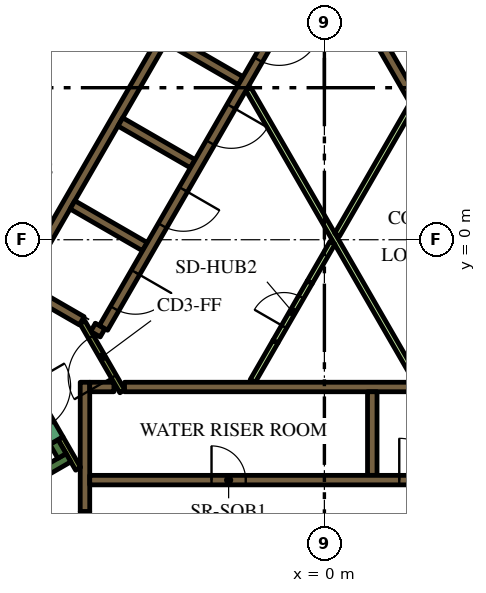
"""IFC4 building model, lengths in metres.
Left out: names, types, materials, properties, quantities, classifications, styles, units other than length and angle.
Written with IfcOpenShell. Run it as: python <this file> out.ifc"""

import sys

from ifc_helpers import new_model, si_unit, direction, frame, frame_2d, origin, place, context, subcontext, project, spatial, rectangle, extrude, element, fill, save


model = new_model("IFC4")
c1 = context("Model", 3, precision=1e-05, world=origin(), true_north=direction((0.0, 1.0)))
c2 = subcontext(c1, "Body", "Model", "MODEL_VIEW")
j1 = project(units=[si_unit("LENGTHUNIT", "METRE"), si_unit("PLANEANGLEUNIT", "RADIAN")], contexts=[c1])
p1 = place(None, origin())
s1 = spatial("IfcSite", under=j1, at=p1, CompositionType="ELEMENT")
p2 = place(p1, origin())
s2 = spatial("IfcBuilding", under=s1, at=p2, CompositionType="ELEMENT")
p3 = place(p2, frame((0.0, 0.0, 118.8)))
s3 = spatial("IfcBuildingStorey", under=s2, at=p3, CompositionType="ELEMENT", Elevation=118.8)
p4 = place(p3, frame((-15.36, -1.503, 0.0), z_axis=(0.0, 0.0, 1.0), x_axis=(0.50000389221, 0.866023156604, 0.0)))
e1 = element("IfcWall", 1, at=p4, inside=s3, PredefinedType="SOLIDWALL", context=c2, shape_type="SweptSolid", body=[
    extrude(rectangle(XDim=21.0, YDim=0.9, at=frame_2d((10.5, 0.0))), origin(), (0.0, 0.0, 1.0), 3.9),
])
p5 = place(p3, frame((-12.84, -9.261, 0.0), z_axis=(0.0, 0.0, 1.0), x_axis=(0.866016039709, 0.500016218704, 0.0)))
e2 = element("IfcWall", 2, at=p5, inside=s3, PredefinedType="SOLIDWALL", context=c2, shape_type="SweptSolid", body=[
    extrude(rectangle(XDim=7.05, YDim=0.25, at=frame_2d((3.525, 0.0))), origin(), (0.0, 0.0, 1.0), 3.9),
])
p6 = place(p3, frame((-6.905, -5.69, 0.0), z_axis=(0.0, 0.0, 1.0), x_axis=(-0.500402024738, 0.865793170242, 0.0)))
e3 = element("IfcWall", 3, at=p6, inside=s3, PredefinedType="SOLIDWALL", context=c2, shape_type="SweptSolid", body=[
    extrude(rectangle(XDim=0.425, YDim=0.25, at=frame_2d((0.212, 0.0))), origin(), (0.0, 0.0, 1.0), 3.9),
])
p7 = place(p3, frame((-5.259, -3.875, 0.0), z_axis=(0.0, 0.0, 1.0), x_axis=(1.0, 0.0, 0.0)))
e4 = element("IfcWall", 4, at=p7, inside=s3, PredefinedType="SOLIDWALL", context=c2, shape_type="SweptSolid", body=[
    extrude(rectangle(XDim=10.489, YDim=0.25, at=frame_2d((5.244, 0.0))), origin(), (0.0, 0.0, 1.0), 3.9),
])
p8 = place(p3, frame((1.26, -4.0, 0.0), z_axis=(0.0, 0.0, 1.0), x_axis=(0.0, -1.0, 0.0)))
e5 = element("IfcWall", 5, at=p8, inside=s3, PredefinedType="SOLIDWALL", context=c2, shape_type="SweptSolid", body=[
    extrude(rectangle(XDim=2.2, YDim=0.25, at=frame_2d((1.1, 0.0))), origin(), (0.0, 0.0, 1.0), 3.9),
])
p9 = place(p3, frame((-6.3, -3.75, 0.0), z_axis=(0.0, 0.0, 1.0), x_axis=(0.0, -1.0, 0.0)))
e6 = element("IfcWall", 6, at=p9, inside=s3, PredefinedType="SOLIDWALL", context=c2, shape_type="SweptSolid", body=[
    extrude(rectangle(XDim=3.404, YDim=0.25, at=frame_2d((1.702, 0.0))), origin(), (0.0, 0.0, 1.0), 3.9),
])
p10 = place(p3, frame((-6.175, -3.875, 0.0), z_axis=(0.0, 0.0, 1.0), x_axis=(1.0, 0.0, 0.0)))
e7 = element("IfcWall", 7, at=p10, inside=s3, PredefinedType="SOLIDWALL", context=c2, shape_type="SweptSolid", body=[
    extrude(rectangle(XDim=0.637, YDim=0.25, at=frame_2d((0.318, 0.0))), origin(), (0.0, 0.0, 1.0), 3.9),
])
p11 = place(p3, frame((5.97, -2.591, 0.0), z_axis=(0.0, 0.0, 1.0), x_axis=(-0.499994469932, 0.866028596547, 0.0)))
e8 = element("IfcWall", 8, at=p11, inside=s3, PredefinedType="SOLIDWALL", context=c2, shape_type="SweptSolid", body=[
    extrude(rectangle(XDim=10.488, YDim=0.25, at=frame_2d((5.244, 0.0))), origin(), (0.0, 0.0, 1.0), 3.9),
])
p12 = place(p3, frame((-8.06, -1.311, 0.0), z_axis=(0.0, 0.0, 1.0), x_axis=(0.50000273126, 0.866023826885, 0.0)))
e9 = element("IfcWall", 9, at=p12, inside=s3, PredefinedType="SOLIDWALL", context=c2, shape_type="SweptSolid", body=[
    extrude(rectangle(XDim=10.33, YDim=0.25, at=frame_2d((5.165, 0.0))), origin(), (0.0, 0.0, 1.0), 3.9),
])
for number, where, z_axis, x_axis in (
    (10, (-2.204, 4.182, 0.0), (0.0, 0.0, 1.0), (-0.866, 0.5, 0.0)),
    (11, (-5.369, 3.1, 0.0), (0.0, 0.0, 1.0), (0.866, -0.5, 0.0)),
    (12, (-4.724, -0.182, 0.0), (0.0, 0.0, 1.0), (-0.866, 0.5, 0.0)),
):
    element("IfcWall", number, at=place(p3, frame(where, z_axis=z_axis, x_axis=x_axis)), inside=s3, PredefinedType="SOLIDWALL", context=c2, shape_type="SweptSolid", body=[
        extrude(rectangle(XDim=2.2, YDim=0.25, at=frame_2d((1.1, 0.0))), origin(), (0.0, 0.0, 1.0), 3.9),
    ])
p13 = place(p3, frame((-6.088, -2.305, 0.0), z_axis=(0.0, 0.0, 1.0), x_axis=(0.866059450854, -0.499941024108, 0.0)))
e13 = element("IfcWall", 13, at=p13, inside=s3, PredefinedType="SOLIDWALL", context=c2, shape_type="SweptSolid", body=[
    extrude(rectangle(XDim=0.29, YDim=0.25, at=frame_2d((0.145, 0.0))), origin(), (0.0, 0.0, 1.0), 3.9),
])
p14 = place(p3, frame((-7.889, -1.265, 0.0), z_axis=(0.0, 0.0, 1.0), x_axis=(0.865986741702, -0.500066958712, 0.0)))
e14 = element("IfcWall", 14, at=p14, inside=s3, PredefinedType="SOLIDWALL", context=c2, shape_type="SweptSolid", body=[
    extrude(rectangle(XDim=1.738, YDim=0.25, at=frame_2d((0.869, 0.0))), origin(), (0.0, 0.0, 1.0), 3.9),
])
p15 = place(p3, frame((-6.48, -6.027, 0.0), z_axis=(0.0, 0.0, 1.0), x_axis=(-0.499927229454, 0.866067413802, 0.0)))
e15 = element("IfcWall", 15, at=p15, inside=s3, PredefinedType="PARTITIONING", context=c2, shape_type="SweptSolid", body=[
    extrude(rectangle(XDim=0.929, YDim=0.15, at=frame_2d((0.464, 0.0))), origin(), (0.0, 0.0, 1.0), 3.9),
])
p16 = place(p3, frame((-1.887, -3.718, 0.0), z_axis=(0.0, 0.0, 1.0), x_axis=(0.500057179532, 0.865992388649, 0.0)))
e16 = element("IfcWall", 16, at=p16, inside=s3, PredefinedType="PARTITIONING", context=c2, shape_type="SweptSolid", body=[
    extrude(rectangle(XDim=1.199, YDim=0.15, at=frame_2d((0.6, 0.0))), origin(), (0.0, 0.0, 1.0), 2.75),
])
p17 = place(p3, frame((2.435, -3.718, 0.0), z_axis=(0.0, 0.0, 1.0), x_axis=(-0.499985176046, 0.866033962229, 0.0)))
e17 = element("IfcWall", 17, at=p17, inside=s3, PredefinedType="PARTITIONING", context=c2, shape_type="SweptSolid", body=[
    extrude(rectangle(XDim=8.875, YDim=0.15, at=frame_2d((4.438, 0.0))), origin(), (0.0, 0.0, 1.0), 2.75),
])
p18 = place(p3, frame((0.336, 0.132, 0.0), z_axis=(0.0, 0.0, 1.0), x_axis=(0.500001957507, 0.866024273614, 0.0)))
e18 = element("IfcWall", 18, at=p18, inside=s3, PredefinedType="PARTITIONING", context=c2, shape_type="SweptSolid", body=[
    extrude(rectangle(XDim=3.881, YDim=0.15, at=frame_2d((1.941, 0.0))), origin(), (0.0, 0.0, 1.0), 2.75),
])
p19 = place(p3, frame((-0.387, -1.121, 0.0), z_axis=(0.0, 0.0, 1.0), x_axis=(0.500057179532, 0.865992388649, 0.0)))
e19 = element("IfcWall", 19, at=p19, inside=s3, PredefinedType="PARTITIONING", context=c2, shape_type="SweptSolid", body=[
    extrude(rectangle(XDim=1.199, YDim=0.15, at=frame_2d((0.6, 0.0))), origin(), (0.0, 0.0, 1.0), 2.75),
])
p20 = place(p3, frame((-6.175, -6.325, 0.0), z_axis=(0.0, 0.0, 1.0), x_axis=(1.0, 0.0, 0.0)))
e20 = element("IfcWall", 20, at=p20, inside=s3, PredefinedType="SOLIDWALL", context=c2, shape_type="SweptSolid", body=[
    extrude(rectangle(XDim=12.35, YDim=0.25, at=frame_2d((6.175, 0.0))), origin(), (0.0, 0.0, 1.0), 3.9),
])
p21 = place(p20, frame((3.205, 0.0, 0.0)))
e21 = element("IfcOpeningElement", 21, at=p21, cuts=e20, PredefinedType="OPENING", context=c2, shape_type="SweptSolid", body=[
    extrude(rectangle(XDim=0.9, YDim=2.1, at=frame_2d((0.45, 1.05))), frame((0.0, 0.135, 0.0), z_axis=(0.0, -1.0, 0.0), x_axis=(1.0, 0.0, 0.0)), (0.0, 0.0, 1.0), 0.27),
])
p22 = place(p20, frame((8.145, 0.0, 0.0)))
e22 = element("IfcOpeningElement", 22, at=p22, cuts=e20, PredefinedType="OPENING", context=c2, shape_type="SweptSolid", body=[
    extrude(rectangle(XDim=1.1, YDim=2.1, at=frame_2d((0.55, 1.05))), frame((0.0, 0.135, 0.0), z_axis=(0.0, -1.0, 0.0), x_axis=(1.0, 0.0, 0.0)), (0.0, 0.0, 1.0), 0.27),
])
p23 = place(p20, frame((10.665, 0.0, 0.0)))
e23 = element("IfcOpeningElement", 23, at=p23, cuts=e20, PredefinedType="OPENING", context=c2, shape_type="SweptSolid", body=[
    extrude(rectangle(XDim=1.1, YDim=2.1, at=frame_2d((0.55, 1.05))), frame((0.0, 0.135, 0.0), z_axis=(0.0, -1.0, 0.0), x_axis=(1.0, 0.0, 0.0)), (0.0, 0.0, 1.0), 0.27),
])
p24 = place(p3, frame((-6.008, 9.144, 0.0), z_axis=(0.0, 0.0, 1.0), x_axis=(-0.500006956611, -0.866021387346, 0.0)))
e24 = element("IfcWall", 24, at=p24, inside=s3, PredefinedType="SOLIDWALL", context=c2, shape_type="SweptSolid", body=[
    extrude(rectangle(XDim=9.83, YDim=0.25, at=frame_2d((4.915, 0.0))), origin(), (0.0, 0.0, 1.0), 3.9),
])
p25 = place(p24, frame((6.985, 0.0, 0.0)))
e25 = element("IfcOpeningElement", 25, at=p25, cuts=e24, PredefinedType="OPENING", context=c2, shape_type="SweptSolid", body=[
    extrude(rectangle(XDim=0.9, YDim=2.1, at=frame_2d((0.45, 1.05))), frame((0.0, 0.135, 0.0), z_axis=(0.0, -1.0, 0.0), x_axis=(1.0, 0.0, 0.0)), (0.0, 0.0, 1.0), 0.27),
])
p26 = place(p3, frame((-0.898, 6.194, 0.0), z_axis=(0.0, 0.0, 1.0), x_axis=(-0.499996202215, -0.866027596426, 0.0)))
e26 = element("IfcWall", 26, at=p26, inside=s3, PredefinedType="SOLIDWALL", context=c2, shape_type="SweptSolid", body=[
    extrude(rectangle(XDim=9.83, YDim=0.25, at=frame_2d((4.915, 0.0))), origin(), (0.0, 0.0, 1.0), 3.9),
])
p27 = place(p26, frame((0.585, 0.0, 0.0)))
e27 = element("IfcOpeningElement", 27, at=p27, cuts=e26, PredefinedType="OPENING", context=c2, shape_type="SweptSolid", body=[
    extrude(rectangle(XDim=1.1, YDim=2.1, at=frame_2d((0.55, 1.05))), frame((0.0, 0.135, 0.0), z_axis=(0.0, -1.0, 0.0), x_axis=(1.0, 0.0, 0.0)), (0.0, 0.0, 1.0), 0.27),
])
p28 = place(p26, frame((3.105, 0.0, 0.0)))
e28 = element("IfcOpeningElement", 28, at=p28, cuts=e26, PredefinedType="OPENING", context=c2, shape_type="SweptSolid", body=[
    extrude(rectangle(XDim=1.1, YDim=2.1, at=frame_2d((0.55, 1.05))), frame((0.0, 0.135, 0.0), z_axis=(0.0, -1.0, 0.0), x_axis=(1.0, 0.0, 0.0)), (0.0, 0.0, 1.0), 0.27),
])
p29 = place(p26, frame((5.625, 0.0, 0.0)))
e29 = element("IfcOpeningElement", 29, at=p29, cuts=e26, PredefinedType="OPENING", context=c2, shape_type="SweptSolid", body=[
    extrude(rectangle(XDim=1.1, YDim=2.1, at=frame_2d((0.55, 1.05))), frame((0.0, 0.135, 0.0), z_axis=(0.0, -1.0, 0.0), x_axis=(1.0, 0.0, 0.0)), (0.0, 0.0, 1.0), 0.27),
])
p30 = place(p26, frame((8.145, 0.0, 0.0)))
e30 = element("IfcOpeningElement", 30, at=p30, cuts=e26, PredefinedType="OPENING", context=c2, shape_type="SweptSolid", body=[
    extrude(rectangle(XDim=1.1, YDim=2.1, at=frame_2d((0.55, 1.05))), frame((0.0, 0.135, 0.0), z_axis=(0.0, -1.0, 0.0), x_axis=(1.0, 0.0, 0.0)), (0.0, 0.0, 1.0), 0.27),
])
p31 = place(p3, frame((-8.103, -3.466, 0.0), z_axis=(0.0, 0.0, 1.0), x_axis=(0.500078061341, -0.865980330357, 0.0)))
e31 = element("IfcWall", 31, at=p31, inside=s3, PredefinedType="SOLIDWALL", context=c2, shape_type="SweptSolid", body=[
    extrude(rectangle(XDim=2.1, YDim=0.4, at=frame_2d((1.05, 0.0))), origin(), (0.0, 0.0, 1.0), 3.9),
])
p32 = place(p31, frame((0.45, 0.0, 0.0)))
e32 = element("IfcOpeningElement", 32, at=p32, cuts=e31, PredefinedType="OPENING", context=c2, shape_type="SweptSolid", body=[
    extrude(rectangle(XDim=1.2, YDim=2.1, at=frame_2d((0.6, 1.05))), frame((0.0, 0.21, 0.0), z_axis=(0.0, -1.0, 0.0), x_axis=(1.0, 0.0, 0.0)), (0.0, 0.0, 1.0), 0.42),
])
p33 = place(p3, frame((-6.3, -7.154, 0.0), z_axis=(0.0, 0.0, 1.0), x_axis=(0.0, -1.0, 0.0)))
e33 = element("IfcWall", 33, at=p33, inside=s3, PredefinedType="SOLIDWALL", context=c2, shape_type="SweptSolid", body=[
    extrude(rectangle(XDim=1.8, YDim=0.25, at=frame_2d((0.9, 0.0))), origin(), (0.0, 0.0, 1.0), 3.9),
])
p34 = place(p33, frame((0.45, 0.0, 0.0)))
e34 = element("IfcOpeningElement", 34, at=p34, cuts=e33, PredefinedType="OPENING", context=c2, shape_type="SweptSolid", body=[
    extrude(rectangle(XDim=0.9, YDim=2.1, at=frame_2d((0.45, 1.05))), frame((0.0, 0.135, 0.0), z_axis=(0.0, -1.0, 0.0), x_axis=(1.0, 0.0, 0.0)), (0.0, 0.0, 1.0), 0.27),
])
p35 = place(p3, frame((-5.317, -3.99, 0.0), z_axis=(0.0, 0.0, 1.0), x_axis=(-0.500027713859, 0.866009402589, 0.0)))
e35 = element("IfcWall", 35, at=p35, inside=s3, PredefinedType="PARTITIONING", context=c2, shape_type="SweptSolid", body=[
    extrude(rectangle(XDim=2.1, YDim=0.15, at=frame_2d((1.05, 0.0))), origin(), (0.0, 0.0, 1.0), 3.9),
])
p36 = place(p35, frame((0.45, 0.0, 0.0)))
e36 = element("IfcOpeningElement", 36, at=p36, cuts=e35, PredefinedType="OPENING", context=c2, shape_type="SweptSolid", body=[
    extrude(rectangle(XDim=1.2, YDim=2.1, at=frame_2d((0.6, 1.05))), frame((0.0, 0.085, 0.0), z_axis=(0.0, -1.0, 0.0), x_axis=(1.0, 0.0, 0.0)), (0.0, 0.0, 1.0), 0.17),
])
p37 = place(p3, frame((-1.287, -2.679, 0.0), z_axis=(0.0, 0.0, 1.0), x_axis=(0.499961193289, 0.866047807691, 0.0)))
e37 = element("IfcWall", 37, at=p37, inside=s3, PredefinedType="PARTITIONING", context=c2, shape_type="SweptSolid", body=[
    extrude(rectangle(XDim=1.8, YDim=0.15, at=frame_2d((0.9, 0.0))), origin(), (0.0, 0.0, 1.0), 2.75),
])
p38 = place(p37, frame((0.45, 0.0, 0.0)))
e38 = element("IfcOpeningElement", 38, at=p38, cuts=e37, PredefinedType="OPENING", context=c2, shape_type="SweptSolid", body=[
    extrude(rectangle(XDim=0.9, YDim=2.1, at=frame_2d((0.45, 1.05))), frame((0.0, 0.085, 0.0), z_axis=(0.0, -1.0, 0.0), x_axis=(1.0, 0.0, 0.0)), (0.0, 0.0, 1.0), 0.17),
])
p39 = place(p3, frame((-19.081, -3.9, 0.0), z_axis=(0.0, 0.0, 1.0), x_axis=(0.499998313975, 0.866026377209, 0.0)))
e39 = element("IfcWall", 39, at=p39, inside=s3, PredefinedType="PARTITIONING", context=c2, shape_type="SweptSolid", body=[
    extrude(rectangle(XDim=25.766, YDim=0.15, at=frame_2d((12.883, 0.0))), origin(), (0.0, 0.0, 1.0), 2.75),
])
p40 = place(p39, frame((19.306, 0.0, 0.0)))
e40 = element("IfcOpeningElement", 40, at=p40, cuts=e39, PredefinedType="OPENING", context=c2, shape_type="SweptSolid", body=[
    extrude(rectangle(XDim=1.0, YDim=2.1, at=frame_2d((0.5, 1.05))), frame((0.0, 0.085, 0.0), z_axis=(0.0, -1.0, 0.0), x_axis=(1.0, 0.0, 0.0)), (0.0, 0.0, 1.0), 0.17),
])
p41 = place(p39, frame((18.0, 0.0, 0.0)))
e41 = element("IfcOpeningElement", 41, at=p41, cuts=e39, PredefinedType="OPENING", context=c2, shape_type="SweptSolid", body=[
    extrude(rectangle(XDim=1.0, YDim=2.1, at=frame_2d((0.5, 1.05))), frame((0.0, 0.085, 0.0), z_axis=(0.0, -1.0, 0.0), x_axis=(1.0, 0.0, 0.0)), (0.0, 0.0, 1.0), 0.17),
])
p42 = place(p39, frame((7.793, 0.0, 0.0)))
e42 = element("IfcOpeningElement", 42, at=p42, cuts=e39, PredefinedType="OPENING", context=c2, shape_type="SweptSolid", body=[
    extrude(rectangle(XDim=0.9, YDim=2.1, at=frame_2d((0.45, 1.05))), frame((0.0, 0.085, 0.0), z_axis=(0.0, -1.0, 0.0), x_axis=(1.0, 0.0, 0.0)), (0.0, 0.0, 1.0), 0.17),
])
p43 = place(p39, frame((4.674, 0.0, 0.0)))
e43 = element("IfcOpeningElement", 43, at=p43, cuts=e39, PredefinedType="OPENING", context=c2, shape_type="SweptSolid", body=[
    extrude(rectangle(XDim=0.9, YDim=2.1, at=frame_2d((0.45, 1.05))), frame((0.0, 0.085, 0.0), z_axis=(0.0, -1.0, 0.0), x_axis=(1.0, 0.0, 0.0)), (0.0, 0.0, 1.0), 0.17),
])
p44 = place(p39, frame((0.18, 0.0, 0.0)))
e44 = element("IfcOpeningElement", 44, at=p44, cuts=e39, PredefinedType="OPENING", context=c2, shape_type="SweptSolid", body=[
    extrude(rectangle(XDim=1.0, YDim=2.1, at=frame_2d((0.5, 1.05))), frame((0.0, 0.085, 0.0), z_axis=(0.0, -1.0, 0.0), x_axis=(1.0, 0.0, 0.0)), (0.0, 0.0, 1.0), 0.17),
])
p45 = place(p21, origin())
e45 = element("IfcDoor", 45, at=p45, inside=s3, OperationType="SINGLE_SWING_LEFT", PredefinedType="DOOR", context=c2, shape_type="SweptSolid", body=[
    extrude(rectangle(XDim=0.9, YDim=2.1, at=frame_2d((0.45, 1.05))), frame((0.0, 0.025, 0.0), z_axis=(0.0, -1.0, 0.0), x_axis=(1.0, 0.0, 0.0)), (0.0, 0.0, 1.0), 0.05),
])
fill(e21, e45)
p46 = place(p22, origin())
e46 = element("IfcDoor", 46, at=p46, inside=s3, OperationType="DOUBLE_DOOR_SLIDING", PredefinedType="DOOR", context=c2, shape_type="SweptSolid", body=[
    extrude(rectangle(XDim=1.1, YDim=2.1, at=frame_2d((0.55, 1.05))), frame((0.0, 0.025, 0.0), z_axis=(0.0, -1.0, 0.0), x_axis=(1.0, 0.0, 0.0)), (0.0, 0.0, 1.0), 0.05),
])
fill(e22, e46)
p47 = place(p27, origin())
e47 = element("IfcDoor", 47, at=p47, inside=s3, OperationType="DOUBLE_DOOR_SLIDING", PredefinedType="DOOR", context=c2, shape_type="SweptSolid", body=[
    extrude(rectangle(XDim=1.1, YDim=2.1, at=frame_2d((0.55, 1.05))), frame((0.0, 0.025, 0.0), z_axis=(0.0, -1.0, 0.0), x_axis=(1.0, 0.0, 0.0)), (0.0, 0.0, 1.0), 0.05),
])
fill(e27, e47)
p48 = place(p28, origin())
e48 = element("IfcDoor", 48, at=p48, inside=s3, OperationType="DOUBLE_DOOR_SLIDING", PredefinedType="DOOR", context=c2, shape_type="SweptSolid", body=[
    extrude(rectangle(XDim=1.1, YDim=2.1, at=frame_2d((0.55, 1.05))), frame((0.0, 0.025, 0.0), z_axis=(0.0, -1.0, 0.0), x_axis=(1.0, 0.0, 0.0)), (0.0, 0.0, 1.0), 0.05),
])
fill(e28, e48)
p49 = place(p29, origin())
e49 = element("IfcDoor", 49, at=p49, inside=s3, OperationType="DOUBLE_DOOR_SLIDING", PredefinedType="DOOR", context=c2, shape_type="SweptSolid", body=[
    extrude(rectangle(XDim=1.1, YDim=2.1, at=frame_2d((0.55, 1.05))), frame((0.0, 0.025, 0.0), z_axis=(0.0, -1.0, 0.0), x_axis=(1.0, 0.0, 0.0)), (0.0, 0.0, 1.0), 0.05),
])
fill(e29, e49)
p50 = place(p30, origin())
e50 = element("IfcDoor", 50, at=p50, inside=s3, OperationType="DOUBLE_DOOR_SLIDING", PredefinedType="DOOR", context=c2, shape_type="SweptSolid", body=[
    extrude(rectangle(XDim=1.1, YDim=2.1, at=frame_2d((0.55, 1.05))), frame((0.0, 0.025, 0.0), z_axis=(0.0, -1.0, 0.0), x_axis=(1.0, 0.0, 0.0)), (0.0, 0.0, 1.0), 0.05),
])
fill(e30, e50)
p51 = place(p36, origin())
e51 = element("IfcDoor", 51, at=p51, inside=s3, OperationType="SINGLE_SWING_LEFT", PredefinedType="DOOR", context=c2, shape_type="SweptSolid", body=[
    extrude(rectangle(XDim=1.2, YDim=2.1, at=frame_2d((0.6, 1.05))), frame((0.0, 0.025, 0.0), z_axis=(0.0, -1.0, 0.0), x_axis=(1.0, 0.0, 0.0)), (0.0, 0.0, 1.0), 0.05),
])
fill(e36, e51)
p52 = place(p38, origin())
e52 = element("IfcDoor", 52, at=p52, inside=s3, OperationType="SINGLE_SWING_LEFT", PredefinedType="DOOR", context=c2, shape_type="SweptSolid", body=[
    extrude(rectangle(XDim=0.9, YDim=2.1, at=frame_2d((0.45, 1.05))), frame((0.0, 0.025, 0.0), z_axis=(0.0, -1.0, 0.0), x_axis=(1.0, 0.0, 0.0)), (0.0, 0.0, 1.0), 0.05),
])
fill(e38, e52)
save(model, sys.argv[1])
